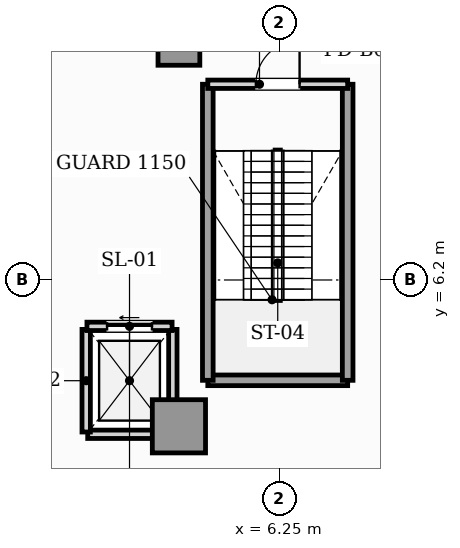
"""IFC4 building model, lengths in metres.
Left out: names, types, materials, properties, quantities, classifications, styles, units other than length and angle.
Written with IfcOpenShell. Run it as: python <this file> out.ifc"""

import sys

from ifc_helpers import new_model, si_unit, direction, frame, frame_2d, origin, origin_2d, place, context, subcontext, project, spatial, rectangle, hollow_rectangle, extrude, element, fill, save


model = new_model("IFC4")
c1 = context("Model", 3, precision=1e-05, world=origin(), true_north=direction((0.0, 1.0)))
c2 = subcontext(c1, "Body", "Model", "MODEL_VIEW")
j1 = project(units=[si_unit("LENGTHUNIT", "METRE"), si_unit("PLANEANGLEUNIT", "RADIAN")], contexts=[c1])
p1 = place(None, origin())
s1 = spatial("IfcSite", under=j1, at=p1, CompositionType="ELEMENT")
p2 = place(p1, origin())
s2 = spatial("IfcBuilding", under=s1, at=p2, CompositionType="ELEMENT")
p3 = place(p2, frame((0.0, 0.0, -5.4)))
s3 = spatial("IfcBuildingStorey", under=s2, at=p3, CompositionType="ELEMENT", Elevation=-5.4)
p4 = place(p3, frame((3.6, 2.35, 0.0), z_axis=(0.0, 0.0, 1.0), x_axis=(1.0, 0.0, 0.0)))
e1 = element("IfcColumn", 1, at=p4, inside=s3, PredefinedType="USERDEFINED", context=c2, shape_type="SweptSolid", body=[
    extrude(hollow_rectangle(XDim=1.4, YDim=1.4, WallThickness=0.08, at=origin_2d()), origin(), (0.0, 0.0, 1.0), 5.4),
])
p5 = place(p3, frame((3.6, 12.4, 0.0), z_axis=(0.0, 0.0, 1.0), x_axis=(1.0, 0.0, 0.0)))
e2 = element("IfcColumn", 2, at=p5, inside=s3, PredefinedType="COLUMN", context=c2, shape_type="SweptSolid", body=[
    extrude(rectangle(XDim=1.1, YDim=1.1, at=origin_2d()), origin(), (0.0, 0.0, 1.0), 5.4),
])
p6 = place(p3, frame((1.2, 2.14, 0.0), z_axis=(0.0, 0.0, 1.0), x_axis=(1.0, 0.0, 0.0)))
e3 = element("IfcWall", 3, at=p6, inside=s3, PredefinedType="SOLIDWALL", context=c2, shape_type="SweptSolid", body=[
    extrude(rectangle(XDim=2.2, YDim=0.22, at=frame_2d((1.1, 0.0))), origin(), (0.0, 0.0, 1.0), 5.05),
])
p7 = place(p3, frame((1.16, 2.2, 0.0), z_axis=(0.0, 0.0, 1.0), x_axis=(0.0, 1.0, 0.0)))
e4 = element("IfcWall", 4, at=p7, inside=s3, PredefinedType="SOLIDWALL", context=c2, shape_type="SweptSolid", body=[
    extrude(rectangle(XDim=2.7, YDim=0.22, at=frame_2d((1.35, 0.0))), origin(), (0.0, 0.0, 1.0), 5.05),
])
p8 = place(p3, frame((3.44, 2.2, 0.0), z_axis=(0.0, 0.0, 1.0), x_axis=(0.0, 1.0, 0.0)))
e5 = element("IfcWall", 5, at=p8, inside=s3, PredefinedType="SOLIDWALL", context=c2, shape_type="SweptSolid", body=[
    extrude(rectangle(XDim=2.7, YDim=0.22, at=frame_2d((1.35, 0.0))), origin(), (0.0, 0.0, 1.0), 4.433),
])
p9 = place(p3, frame((1.18, 4.98, 0.0), z_axis=(0.0, 0.0, 1.0), x_axis=(1.0, 0.0, 0.0)))
e6 = element("IfcWall", 6, at=p9, inside=s3, PredefinedType="SOLIDWALL", context=c2, shape_type="SweptSolid", body=[
    extrude(rectangle(XDim=2.24, YDim=0.22, at=frame_2d((1.12, 0.0))), origin(), (0.0, 0.0, 1.0), 5.05),
])
p10 = place(p9, frame((0.53, 0.0, 0.0)))
e7 = element("IfcOpeningElement", 7, at=p10, cuts=e6, PredefinedType="OPENING", context=c2, shape_type="SweptSolid", body=[
    extrude(rectangle(XDim=1.18, YDim=2.2, at=frame_2d((0.59, 1.1))), frame((0.0, 0.12, 0.0), z_axis=(0.0, -1.0, 0.0), x_axis=(1.0, 0.0, 0.0)), (0.0, 0.0, 1.0), 0.24),
])
p11 = place(p3, frame((4.36, 3.56, 0.0), z_axis=(0.0, 0.0, 1.0), x_axis=(1.0, 0.0, 0.0)))
e8 = element("IfcWall", 8, at=p11, inside=s3, PredefinedType="SHEAR", context=c2, shape_type="SweptSolid", body=[
    extrude(rectangle(XDim=3.68, YDim=0.28, at=frame_2d((1.84, 0.0))), origin(), (0.0, 0.0, 1.0), 5.05),
])
for number, where, z_axis, x_axis in (
    (9, (4.36, 3.56, 0.0), (0.0, 0.0, 1.0), (0.0, 1.0, 0.0)),
    (10, (8.04, 3.56, 0.0), (0.0, 0.0, 1.0), (0.0, 1.0, 0.0)),
):
    element("IfcWall", number, at=place(p3, frame(where, z_axis=z_axis, x_axis=x_axis)), inside=s3, PredefinedType="SHEAR", context=c2, shape_type="SweptSolid", body=[
        extrude(rectangle(XDim=7.79, YDim=0.28, at=frame_2d((3.895, 0.0))), origin(), (0.0, 0.0, 1.0), 5.05),
    ])
p12 = place(p3, frame((4.36, 11.35, 0.0), z_axis=(0.0, 0.0, 1.0), x_axis=(1.0, 0.0, 0.0)))
e11 = element("IfcWall", 11, at=p12, inside=s3, PredefinedType="SOLIDWALL", context=c2, shape_type="SweptSolid", body=[
    extrude(rectangle(XDim=3.68, YDim=0.22, at=frame_2d((1.84, 0.0))), origin(), (0.0, 0.0, 1.0), 5.05),
])
p13 = place(p12, frame((1.265, 0.0, 0.0)))
e12 = element("IfcOpeningElement", 12, at=p13, cuts=e11, PredefinedType="OPENING", context=c2, shape_type="SweptSolid", body=[
    extrude(rectangle(XDim=1.15, YDim=2.2, at=frame_2d((0.575, 1.1))), frame((0.0, 0.12, 0.0), z_axis=(0.0, -1.0, 0.0), x_axis=(1.0, 0.0, 0.0)), (0.0, 0.0, 1.0), 0.24),
])
p14 = place(p10, origin())
e13 = element("IfcDoor", 13, at=p14, inside=s3, OperationType="SLIDING_TO_LEFT", PredefinedType="DOOR", context=c2, shape_type="SweptSolid", body=[
    extrude(rectangle(XDim=1.18, YDim=2.2, at=frame_2d((0.59, 1.1))), frame((0.0, 0.025, 0.0), z_axis=(0.0, -1.0, 0.0), x_axis=(1.0, 0.0, 0.0)), (0.0, 0.0, 1.0), 0.05),
])
fill(e7, e13)
p15 = place(p13, origin())
e14 = element("IfcDoor", 14, at=p15, inside=s3, OperationType="SINGLE_SWING_RIGHT", PredefinedType="DOOR", context=c2, shape_type="SweptSolid", body=[
    extrude(rectangle(XDim=1.15, YDim=2.2, at=frame_2d((0.575, 1.1))), frame((0.0, 0.025, 0.0), z_axis=(0.0, -1.0, 0.0), x_axis=(1.0, 0.0, 0.0)), (0.0, 0.0, 1.0), 0.05),
])
fill(e12, e14)
save(model, sys.argv[1])
